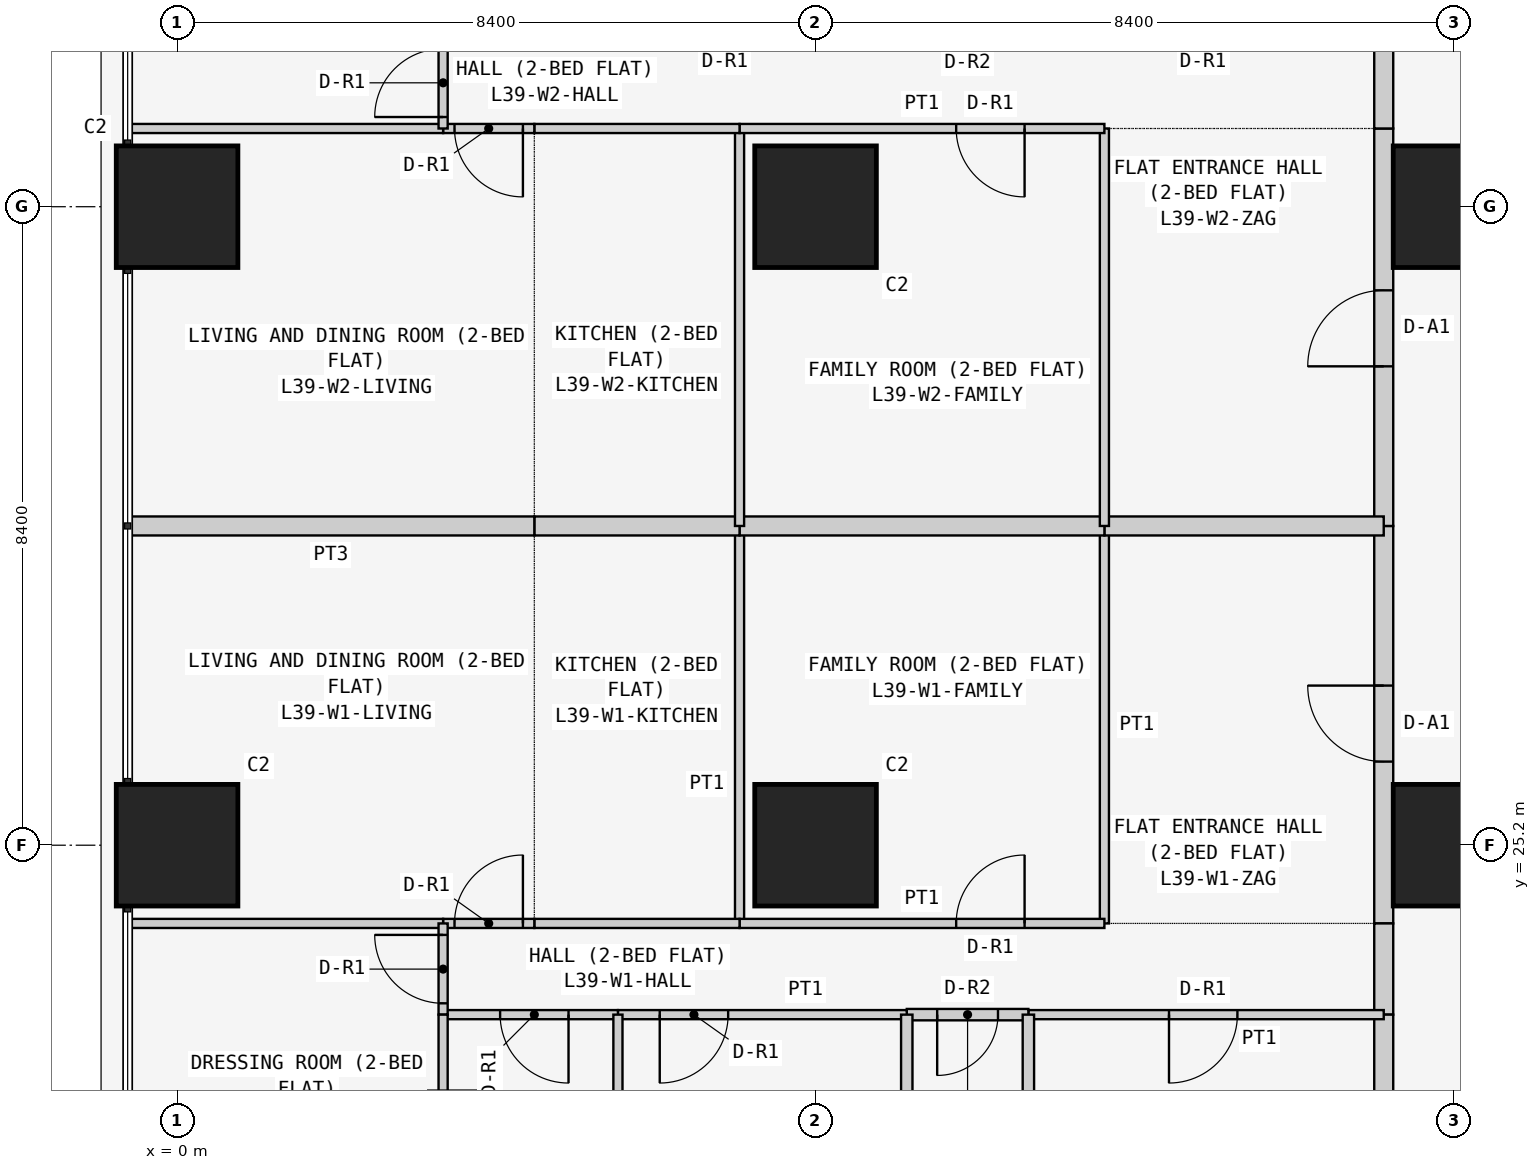
"""IFC4 building model, lengths in metres.
Left out: names, types, materials, properties, quantities, classifications, styles, units other than length and angle.
Written with IfcOpenShell. Run it as: python <this file> out.ifc"""

import sys

from ifc_helpers import new_model, si_unit, direction, frame, frame_2d, origin, origin_2d, place, context, subcontext, project, spatial, rectangle, extrude, element, fill, save


model = new_model("IFC4")
c1 = context("Model", 3, precision=1e-05, world=origin(), true_north=direction((0.0, 1.0)))
c2 = subcontext(c1, "Body", "Model", "MODEL_VIEW")
j1 = project(units=[si_unit("LENGTHUNIT", "METRE"), si_unit("PLANEANGLEUNIT", "RADIAN")], contexts=[c1])
p1 = place(None, origin())
s1 = spatial("IfcSite", under=j1, at=p1, CompositionType="ELEMENT")
p2 = place(p1, origin())
s2 = spatial("IfcBuilding", under=s1, at=p2, CompositionType="ELEMENT")
p3 = place(p2, frame((0.0, 0.0, 152.1)))
s3 = spatial("IfcBuildingStorey", under=s2, at=p3, CompositionType="ELEMENT", Elevation=152.1)
for number, where, z_axis, x_axis in (
    (1, (0.0, 25.2, 0.0), (0.0, 0.0, 1.0), (1.0, 0.0, 0.0)),
    (2, (0.0, 33.6, 0.0), (0.0, 0.0, 1.0), (1.0, 0.0, 0.0)),
    (3, (8.4, 25.2, 0.0), (0.0, 0.0, 1.0), (1.0, 0.0, 0.0)),
    (4, (8.4, 33.6, 0.0), (0.0, 0.0, 1.0), (1.0, 0.0, 0.0)),
    (5, (16.8, 25.2, 0.0), (0.0, 0.0, 1.0), (1.0, 0.0, 0.0)),
    (6, (16.8, 33.6, 0.0), (0.0, 0.0, 1.0), (1.0, 0.0, 0.0)),
):
    element("IfcColumn", number, at=place(p3, frame(where, z_axis=z_axis, x_axis=x_axis)), inside=s3, PredefinedType="COLUMN", context=c2, shape_type="SweptSolid", body=[
        extrude(rectangle(XDim=1.6, YDim=1.6, at=origin_2d()), origin(), (0.0, 0.0, 1.0), 3.6),
    ])
p4 = place(p3, frame((15.875, 24.171, 0.0), z_axis=(0.0, 0.0, 1.0), x_axis=(0.0, 1.0, 0.0)))
e7 = element("IfcWall", 7, at=p4, inside=s3, PredefinedType="PARTITIONING", context=c2, shape_type="SweptSolid", body=[
    extrude(rectangle(XDim=5.229, YDim=0.25, at=frame_2d((2.615, 0.0))), origin(), (0.0, 0.0, 1.0), 3.45),
])
p5 = place(p4, frame((2.129, 0.0, 0.0)))
e8 = element("IfcOpeningElement", 8, at=p5, cuts=e7, PredefinedType="OPENING", context=c2, shape_type="SweptSolid", body=[
    extrude(rectangle(XDim=1.0, YDim=2.1, at=frame_2d((0.5, 1.05))), frame((0.0, 0.135, 0.0), z_axis=(0.0, -1.0, 0.0), x_axis=(1.0, 0.0, 0.0)), (0.0, 0.0, 1.0), 0.27),
])
p6 = place(p3, frame((15.875, 22.971, 0.0), z_axis=(0.0, 0.0, 1.0), x_axis=(0.0, 1.0, 0.0)))
e9 = element("IfcWall", 9, at=p6, inside=s3, PredefinedType="PARTITIONING", context=c2, shape_type="SweptSolid", body=[
    extrude(rectangle(XDim=1.2, YDim=0.25, at=frame_2d((0.6, 0.0))), origin(), (0.0, 0.0, 1.0), 3.45),
])
p7 = place(p3, frame((15.875, 16.1, 0.0), z_axis=(0.0, 0.0, 1.0), x_axis=(0.0, 1.0, 0.0)))
e10 = element("IfcWall", 10, at=p7, inside=s3, PredefinedType="PARTITIONING", context=c2, shape_type="SweptSolid", body=[
    extrude(rectangle(XDim=6.871, YDim=0.25, at=frame_2d((3.436, 0.0))), origin(), (0.0, 0.0, 1.0), 3.45),
])
p8 = place(p3, frame((15.875, 29.4, 0.0), z_axis=(0.0, 0.0, 1.0), x_axis=(0.0, 1.0, 0.0)))
e11 = element("IfcWall", 11, at=p8, inside=s3, PredefinedType="PARTITIONING", context=c2, shape_type="SweptSolid", body=[
    extrude(rectangle(XDim=5.229, YDim=0.25, at=frame_2d((2.615, 0.0))), origin(), (0.0, 0.0, 1.0), 3.45),
])
p9 = place(p8, frame((2.1, 0.0, 0.0)))
e12 = element("IfcOpeningElement", 12, at=p9, cuts=e11, PredefinedType="OPENING", context=c2, shape_type="SweptSolid", body=[
    extrude(rectangle(XDim=1.0, YDim=2.1, at=frame_2d((0.5, 1.05))), frame((0.0, 0.135, 0.0), z_axis=(0.0, -1.0, 0.0), x_axis=(1.0, 0.0, 0.0)), (0.0, 0.0, 1.0), 0.27),
])
p10 = place(p3, frame((15.875, 34.629, 0.0), z_axis=(0.0, 0.0, 1.0), x_axis=(0.0, 1.0, 0.0)))
e13 = element("IfcWall", 13, at=p10, inside=s3, PredefinedType="PARTITIONING", context=c2, shape_type="SweptSolid", body=[
    extrude(rectangle(XDim=1.2, YDim=0.25, at=frame_2d((0.6, 0.0))), origin(), (0.0, 0.0, 1.0), 3.45),
])
p11 = place(p3, frame((12.2, 29.4, 0.0), z_axis=(0.0, 0.0, 1.0), x_axis=(0.0, -1.0, 0.0)))
e14 = element("IfcWall", 14, at=p11, inside=s3, PredefinedType="PARTITIONING", context=c2, shape_type="SweptSolid", body=[
    extrude(rectangle(XDim=5.229, YDim=0.12, at=frame_2d((2.615, 0.0))), origin(), (0.0, 0.0, 1.0), 3.45),
])
p12 = place(p3, frame((15.875, 29.4, 0.0), z_axis=(0.0, 0.0, 1.0), x_axis=(-1.0, 0.0, 0.0)))
e15 = element("IfcWall", 15, at=p12, inside=s3, PredefinedType="PARTITIONING", context=c2, shape_type="SweptSolid", body=[
    extrude(rectangle(XDim=3.675, YDim=0.25, at=frame_2d((1.837, 0.0))), origin(), (0.0, 0.0, 1.0), 3.45),
])
p13 = place(p3, frame((7.4, 29.4, 0.0), z_axis=(0.0, 0.0, 1.0), x_axis=(0.0, -1.0, 0.0)))
e16 = element("IfcWall", 16, at=p13, inside=s3, PredefinedType="PARTITIONING", context=c2, shape_type="SweptSolid", body=[
    extrude(rectangle(XDim=5.229, YDim=0.12, at=frame_2d((2.615, 0.0))), origin(), (0.0, 0.0, 1.0), 3.45),
])
p14 = place(p3, frame((7.4, 24.171, 0.0), z_axis=(0.0, 0.0, 1.0), x_axis=(1.0, 0.0, 0.0)))
e17 = element("IfcWall", 17, at=p14, inside=s3, PredefinedType="PARTITIONING", context=c2, shape_type="SweptSolid", body=[
    extrude(rectangle(XDim=4.8, YDim=0.12, at=frame_2d((2.4, 0.0))), origin(), (0.0, 0.0, 1.0), 3.45),
])
p15 = place(p14, frame((2.85, 0.0, 0.0)))
e18 = element("IfcOpeningElement", 18, at=p15, cuts=e17, PredefinedType="OPENING", context=c2, shape_type="SweptSolid", body=[
    extrude(rectangle(XDim=0.9, YDim=2.1, at=frame_2d((0.45, 1.05))), frame((0.0, 0.07, 0.0), z_axis=(0.0, -1.0, 0.0), x_axis=(1.0, 0.0, 0.0)), (0.0, 0.0, 1.0), 0.14),
])
p16 = place(p3, frame((12.2, 29.4, 0.0), z_axis=(0.0, 0.0, 1.0), x_axis=(-1.0, 0.0, 0.0)))
e19 = element("IfcWall", 19, at=p16, inside=s3, PredefinedType="PARTITIONING", context=c2, shape_type="SweptSolid", body=[
    extrude(rectangle(XDim=4.8, YDim=0.25, at=frame_2d((2.4, 0.0))), origin(), (0.0, 0.0, 1.0), 3.45),
])
p17 = place(p3, frame((4.7, 24.171, 0.0), z_axis=(0.0, 0.0, 1.0), x_axis=(1.0, 0.0, 0.0)))
e20 = element("IfcWall", 20, at=p17, inside=s3, PredefinedType="PARTITIONING", context=c2, shape_type="SweptSolid", body=[
    extrude(rectangle(XDim=2.7, YDim=0.12, at=frame_2d((1.35, 0.0))), origin(), (0.0, 0.0, 1.0), 3.45),
])
p18 = place(p3, frame((7.4, 29.4, 0.0), z_axis=(0.0, 0.0, 1.0), x_axis=(-1.0, 0.0, 0.0)))
e21 = element("IfcWall", 21, at=p18, inside=s3, PredefinedType="PARTITIONING", context=c2, shape_type="SweptSolid", body=[
    extrude(rectangle(XDim=2.7, YDim=0.25, at=frame_2d((1.35, 0.0))), origin(), (0.0, 0.0, 1.0), 3.45),
])
p19 = place(p3, frame((3.5, 24.171, 0.0), z_axis=(0.0, 0.0, 1.0), x_axis=(1.0, 0.0, 0.0)))
e22 = element("IfcWall", 22, at=p19, inside=s3, PredefinedType="PARTITIONING", context=c2, shape_type="SweptSolid", body=[
    extrude(rectangle(XDim=1.2, YDim=0.12, at=frame_2d((0.6, 0.0))), origin(), (0.0, 0.0, 1.0), 3.45),
])
p20 = place(p19, frame((0.15, 0.0, 0.0)))
e23 = element("IfcOpeningElement", 23, at=p20, cuts=e22, PredefinedType="OPENING", context=c2, shape_type="SweptSolid", body=[
    extrude(rectangle(XDim=0.9, YDim=2.1, at=frame_2d((0.45, 1.05))), frame((0.0, 0.07, 0.0), z_axis=(0.0, -1.0, 0.0), x_axis=(1.0, 0.0, 0.0)), (0.0, 0.0, 1.0), 0.14),
])
p21 = place(p3, frame((-0.65, 24.171, 0.0), z_axis=(0.0, 0.0, 1.0), x_axis=(1.0, 0.0, 0.0)))
e24 = element("IfcWall", 24, at=p21, inside=s3, PredefinedType="PARTITIONING", context=c2, shape_type="SweptSolid", body=[
    extrude(rectangle(XDim=4.15, YDim=0.12, at=frame_2d((2.075, 0.0))), origin(), (0.0, 0.0, 1.0), 3.45),
])
p22 = place(p3, frame((4.7, 29.4, 0.0), z_axis=(0.0, 0.0, 1.0), x_axis=(-1.0, 0.0, 0.0)))
e25 = element("IfcWall", 25, at=p22, inside=s3, PredefinedType="PARTITIONING", context=c2, shape_type="SweptSolid", body=[
    extrude(rectangle(XDim=5.35, YDim=0.25, at=frame_2d((2.675, 0.0))), origin(), (0.0, 0.0, 1.0), 3.45),
])
p23 = place(p3, frame((11.2, 22.971, 0.0), z_axis=(0.0, 0.0, 1.0), x_axis=(1.0, 0.0, 0.0)))
e26 = element("IfcWall", 26, at=p23, inside=s3, PredefinedType="PARTITIONING", context=c2, shape_type="SweptSolid", body=[
    extrude(rectangle(XDim=4.675, YDim=0.12, at=frame_2d((2.337, 0.0))), origin(), (0.0, 0.0, 1.0), 3.45),
])
p24 = place(p23, frame((1.85, 0.0, 0.0)))
e27 = element("IfcOpeningElement", 27, at=p24, cuts=e26, PredefinedType="OPENING", context=c2, shape_type="SweptSolid", body=[
    extrude(rectangle(XDim=0.9, YDim=2.1, at=frame_2d((0.45, 1.05))), frame((0.0, 0.07, 0.0), z_axis=(0.0, -1.0, 0.0), x_axis=(1.0, 0.0, 0.0)), (0.0, 0.0, 1.0), 0.14),
])
p25 = place(p3, frame((9.6, 22.971, 0.0), z_axis=(0.0, 0.0, 1.0), x_axis=(1.0, 0.0, 0.0)))
e28 = element("IfcWall", 28, at=p25, inside=s3, PredefinedType="PARTITIONING", context=c2, shape_type="SweptSolid", body=[
    extrude(rectangle(XDim=1.6, YDim=0.15, at=frame_2d((0.8, 0.0))), origin(), (0.0, 0.0, 1.0), 3.45),
])
p26 = place(p25, frame((0.4, 0.0, 0.0)))
e29 = element("IfcOpeningElement", 29, at=p26, cuts=e28, PredefinedType="OPENING", context=c2, shape_type="SweptSolid", body=[
    extrude(rectangle(XDim=0.8, YDim=2.1, at=frame_2d((0.4, 1.05))), frame((0.0, 0.085, 0.0), z_axis=(0.0, -1.0, 0.0), x_axis=(1.0, 0.0, 0.0)), (0.0, 0.0, 1.0), 0.17),
])
p27 = place(p3, frame((5.8, 22.971, 0.0), z_axis=(0.0, 0.0, 1.0), x_axis=(1.0, 0.0, 0.0)))
e30 = element("IfcWall", 30, at=p27, inside=s3, PredefinedType="PARTITIONING", context=c2, shape_type="SweptSolid", body=[
    extrude(rectangle(XDim=3.8, YDim=0.12, at=frame_2d((1.9, 0.0))), origin(), (0.0, 0.0, 1.0), 3.45),
])
p28 = place(p27, frame((0.55, 0.0, 0.0)))
e31 = element("IfcOpeningElement", 31, at=p28, cuts=e30, PredefinedType="OPENING", context=c2, shape_type="SweptSolid", body=[
    extrude(rectangle(XDim=0.9, YDim=2.1, at=frame_2d((0.45, 1.05))), frame((0.0, 0.07, 0.0), z_axis=(0.0, -1.0, 0.0), x_axis=(1.0, 0.0, 0.0)), (0.0, 0.0, 1.0), 0.14),
])
p29 = place(p3, frame((3.5, 22.971, 0.0), z_axis=(0.0, 0.0, 1.0), x_axis=(1.0, 0.0, 0.0)))
e32 = element("IfcWall", 32, at=p29, inside=s3, PredefinedType="PARTITIONING", context=c2, shape_type="SweptSolid", body=[
    extrude(rectangle(XDim=2.3, YDim=0.12, at=frame_2d((1.15, 0.0))), origin(), (0.0, 0.0, 1.0), 3.45),
])
p30 = place(p29, frame((0.75, 0.0, 0.0)))
e33 = element("IfcOpeningElement", 33, at=p30, cuts=e32, PredefinedType="OPENING", context=c2, shape_type="SweptSolid", body=[
    extrude(rectangle(XDim=0.9, YDim=2.1, at=frame_2d((0.45, 1.05))), frame((0.0, 0.07, 0.0), z_axis=(0.0, -1.0, 0.0), x_axis=(1.0, 0.0, 0.0)), (0.0, 0.0, 1.0), 0.14),
])
p31 = place(p3, frame((3.5, 24.171, 0.0), z_axis=(0.0, 0.0, 1.0), x_axis=(0.0, -1.0, 0.0)))
e34 = element("IfcWall", 34, at=p31, inside=s3, PredefinedType="PARTITIONING", context=c2, shape_type="SweptSolid", body=[
    extrude(rectangle(XDim=1.2, YDim=0.12, at=frame_2d((0.6, 0.0))), origin(), (0.0, 0.0, 1.0), 3.45),
])
p32 = place(p31, frame((0.151, 0.0, 0.0)))
e35 = element("IfcOpeningElement", 35, at=p32, cuts=e34, PredefinedType="OPENING", context=c2, shape_type="SweptSolid", body=[
    extrude(rectangle(XDim=0.9, YDim=2.1, at=frame_2d((0.45, 1.05))), frame((0.0, 0.07, 0.0), z_axis=(0.0, -1.0, 0.0), x_axis=(1.0, 0.0, 0.0)), (0.0, 0.0, 1.0), 0.14),
])
for number, where, z_axis, x_axis in (
    (36, (11.2, 22.971, 0.0), (0.0, 0.0, 1.0), (0.0, -1.0, 0.0)),
    (37, (9.6, 22.971, 0.0), (0.0, 0.0, 1.0), (0.0, -1.0, 0.0)),
):
    element("IfcWall", number, at=place(p3, frame(where, z_axis=z_axis, x_axis=x_axis)), inside=s3, PredefinedType="PARTITIONING", context=c2, shape_type="SweptSolid", body=[
        extrude(rectangle(XDim=6.871, YDim=0.15, at=frame_2d((3.436, 0.0))), origin(), (0.0, 0.0, 1.0), 3.45),
    ])
for number, where, z_axis, x_axis in (
    (38, (5.8, 20.971, 0.0), (0.0, 0.0, 1.0), (0.0, 1.0, 0.0)),
    (39, (3.5, 22.971, 0.0), (0.0, 0.0, 1.0), (0.0, -1.0, 0.0)),
):
    element("IfcWall", number, at=place(p3, frame(where, z_axis=z_axis, x_axis=x_axis)), inside=s3, PredefinedType="PARTITIONING", context=c2, shape_type="SweptSolid", body=[
        extrude(rectangle(XDim=2.0, YDim=0.12, at=frame_2d((1.0, 0.0))), origin(), (0.0, 0.0, 1.0), 3.45),
    ])
for number, where, z_axis, x_axis in (
    (40, (12.2, 29.4, 0.0), (0.0, 0.0, 1.0), (0.0, 1.0, 0.0)),
    (41, (7.4, 29.4, 0.0), (0.0, 0.0, 1.0), (0.0, 1.0, 0.0)),
):
    element("IfcWall", number, at=place(p3, frame(where, z_axis=z_axis, x_axis=x_axis)), inside=s3, PredefinedType="PARTITIONING", context=c2, shape_type="SweptSolid", body=[
        extrude(rectangle(XDim=5.229, YDim=0.12, at=frame_2d((2.615, 0.0))), origin(), (0.0, 0.0, 1.0), 3.45),
    ])
p33 = place(p3, frame((7.4, 34.629, 0.0), z_axis=(0.0, 0.0, 1.0), x_axis=(1.0, 0.0, 0.0)))
e42 = element("IfcWall", 42, at=p33, inside=s3, PredefinedType="PARTITIONING", context=c2, shape_type="SweptSolid", body=[
    extrude(rectangle(XDim=4.8, YDim=0.12, at=frame_2d((2.4, 0.0))), origin(), (0.0, 0.0, 1.0), 3.45),
])
p34 = place(p33, frame((2.85, 0.0, 0.0)))
e43 = element("IfcOpeningElement", 43, at=p34, cuts=e42, PredefinedType="OPENING", context=c2, shape_type="SweptSolid", body=[
    extrude(rectangle(XDim=0.9, YDim=2.1, at=frame_2d((0.45, 1.05))), frame((0.0, 0.07, 0.0), z_axis=(0.0, -1.0, 0.0), x_axis=(1.0, 0.0, 0.0)), (0.0, 0.0, 1.0), 0.14),
])
p35 = place(p3, frame((4.7, 34.629, 0.0), z_axis=(0.0, 0.0, 1.0), x_axis=(1.0, 0.0, 0.0)))
e44 = element("IfcWall", 44, at=p35, inside=s3, PredefinedType="PARTITIONING", context=c2, shape_type="SweptSolid", body=[
    extrude(rectangle(XDim=2.7, YDim=0.12, at=frame_2d((1.35, 0.0))), origin(), (0.0, 0.0, 1.0), 3.45),
])
p36 = place(p3, frame((3.5, 34.629, 0.0), z_axis=(0.0, 0.0, 1.0), x_axis=(1.0, 0.0, 0.0)))
e45 = element("IfcWall", 45, at=p36, inside=s3, PredefinedType="PARTITIONING", context=c2, shape_type="SweptSolid", body=[
    extrude(rectangle(XDim=1.2, YDim=0.12, at=frame_2d((0.6, 0.0))), origin(), (0.0, 0.0, 1.0), 3.45),
])
p37 = place(p36, frame((0.15, 0.0, 0.0)))
e46 = element("IfcOpeningElement", 46, at=p37, cuts=e45, PredefinedType="OPENING", context=c2, shape_type="SweptSolid", body=[
    extrude(rectangle(XDim=0.9, YDim=2.1, at=frame_2d((0.45, 1.05))), frame((0.0, 0.07, 0.0), z_axis=(0.0, -1.0, 0.0), x_axis=(1.0, 0.0, 0.0)), (0.0, 0.0, 1.0), 0.14),
])
p38 = place(p3, frame((-0.65, 34.629, 0.0), z_axis=(0.0, 0.0, 1.0), x_axis=(1.0, 0.0, 0.0)))
e47 = element("IfcWall", 47, at=p38, inside=s3, PredefinedType="PARTITIONING", context=c2, shape_type="SweptSolid", body=[
    extrude(rectangle(XDim=4.15, YDim=0.12, at=frame_2d((2.075, 0.0))), origin(), (0.0, 0.0, 1.0), 3.45),
])
p39 = place(p3, frame((3.5, 34.629, 0.0), z_axis=(0.0, 0.0, 1.0), x_axis=(0.0, 1.0, 0.0)))
e48 = element("IfcWall", 48, at=p39, inside=s3, PredefinedType="PARTITIONING", context=c2, shape_type="SweptSolid", body=[
    extrude(rectangle(XDim=1.2, YDim=0.12, at=frame_2d((0.6, 0.0))), origin(), (0.0, 0.0, 1.0), 3.45),
])
p40 = place(p39, frame((0.151, 0.0, 0.0)))
e49 = element("IfcOpeningElement", 49, at=p40, cuts=e48, PredefinedType="OPENING", context=c2, shape_type="SweptSolid", body=[
    extrude(rectangle(XDim=0.9, YDim=2.1, at=frame_2d((0.45, 1.05))), frame((0.0, 0.07, 0.0), z_axis=(0.0, -1.0, 0.0), x_axis=(1.0, 0.0, 0.0)), (0.0, 0.0, 1.0), 0.14),
])
p41 = place(p5, origin())
e50 = element("IfcDoor", 50, at=p41, inside=s3, OperationType="SINGLE_SWING_RIGHT", PredefinedType="DOOR", context=c2, shape_type="SweptSolid", body=[
    extrude(rectangle(XDim=1.0, YDim=2.1, at=frame_2d((0.5, 1.05))), frame((0.0, 0.025, 0.0), z_axis=(0.0, -1.0, 0.0), x_axis=(1.0, 0.0, 0.0)), (0.0, 0.0, 1.0), 0.05),
])
fill(e8, e50)
p42 = place(p15, origin())
e51 = element("IfcDoor", 51, at=p42, inside=s3, OperationType="SINGLE_SWING_RIGHT", PredefinedType="DOOR", context=c2, shape_type="SweptSolid", body=[
    extrude(rectangle(XDim=0.9, YDim=2.1, at=frame_2d((0.45, 1.05))), frame((0.0, 0.025, 0.0), z_axis=(0.0, -1.0, 0.0), x_axis=(1.0, 0.0, 0.0)), (0.0, 0.0, 1.0), 0.05),
])
fill(e18, e51)
p43 = place(p20, origin())
e52 = element("IfcDoor", 52, at=p43, inside=s3, OperationType="SINGLE_SWING_RIGHT", PredefinedType="DOOR", context=c2, shape_type="SweptSolid", body=[
    extrude(rectangle(XDim=0.9, YDim=2.1, at=frame_2d((0.45, 1.05))), frame((0.0, 0.025, 0.0), z_axis=(0.0, -1.0, 0.0), x_axis=(1.0, 0.0, 0.0)), (0.0, 0.0, 1.0), 0.05),
])
fill(e23, e52)
p44 = place(p24, frame((0.9, 0.0, 0.0), z_axis=(0.0, 0.0, 1.0), x_axis=(-1.0, 0.0, 0.0)))
e53 = element("IfcDoor", 53, at=p44, inside=s3, OperationType="SINGLE_SWING_RIGHT", PredefinedType="DOOR", context=c2, shape_type="SweptSolid", body=[
    extrude(rectangle(XDim=0.9, YDim=2.1, at=frame_2d((0.45, 1.05))), frame((0.0, 0.025, 0.0), z_axis=(0.0, -1.0, 0.0), x_axis=(1.0, 0.0, 0.0)), (0.0, 0.0, 1.0), 0.05),
])
fill(e27, e53)
p45 = place(p26, frame((0.8, 0.0, 0.0), z_axis=(0.0, 0.0, 1.0), x_axis=(-1.0, 0.0, 0.0)))
e54 = element("IfcDoor", 54, at=p45, inside=s3, OperationType="SINGLE_SWING_RIGHT", PredefinedType="DOOR", context=c2, shape_type="SweptSolid", body=[
    extrude(rectangle(XDim=0.8, YDim=2.1, at=frame_2d((0.4, 1.05))), frame((0.0, 0.025, 0.0), z_axis=(0.0, -1.0, 0.0), x_axis=(1.0, 0.0, 0.0)), (0.0, 0.0, 1.0), 0.05),
])
fill(e29, e54)
p46 = place(p28, frame((0.9, 0.0, 0.0), z_axis=(0.0, 0.0, 1.0), x_axis=(-1.0, 0.0, 0.0)))
e55 = element("IfcDoor", 55, at=p46, inside=s3, OperationType="SINGLE_SWING_RIGHT", PredefinedType="DOOR", context=c2, shape_type="SweptSolid", body=[
    extrude(rectangle(XDim=0.9, YDim=2.1, at=frame_2d((0.45, 1.05))), frame((0.0, 0.025, 0.0), z_axis=(0.0, -1.0, 0.0), x_axis=(1.0, 0.0, 0.0)), (0.0, 0.0, 1.0), 0.05),
])
fill(e31, e55)
p47 = place(p30, frame((0.9, 0.0, 0.0), z_axis=(0.0, 0.0, 1.0), x_axis=(-1.0, 0.0, 0.0)))
e56 = element("IfcDoor", 56, at=p47, inside=s3, OperationType="SINGLE_SWING_LEFT", PredefinedType="DOOR", context=c2, shape_type="SweptSolid", body=[
    extrude(rectangle(XDim=0.9, YDim=2.1, at=frame_2d((0.45, 1.05))), frame((0.0, 0.025, 0.0), z_axis=(0.0, -1.0, 0.0), x_axis=(1.0, 0.0, 0.0)), (0.0, 0.0, 1.0), 0.05),
])
fill(e33, e56)
p48 = place(p32, frame((0.9, 0.0, 0.0), z_axis=(0.0, 0.0, 1.0), x_axis=(-1.0, 0.0, 0.0)))
e57 = element("IfcDoor", 57, at=p48, inside=s3, OperationType="SINGLE_SWING_RIGHT", PredefinedType="DOOR", context=c2, shape_type="SweptSolid", body=[
    extrude(rectangle(XDim=0.9, YDim=2.1, at=frame_2d((0.45, 1.05))), frame((0.0, 0.025, 0.0), z_axis=(0.0, -1.0, 0.0), x_axis=(1.0, 0.0, 0.0)), (0.0, 0.0, 1.0), 0.05),
])
fill(e35, e57)
p49 = place(p9, origin())
e58 = element("IfcDoor", 58, at=p49, inside=s3, OperationType="SINGLE_SWING_LEFT", PredefinedType="DOOR", context=c2, shape_type="SweptSolid", body=[
    extrude(rectangle(XDim=1.0, YDim=2.1, at=frame_2d((0.5, 1.05))), frame((0.0, 0.025, 0.0), z_axis=(0.0, -1.0, 0.0), x_axis=(1.0, 0.0, 0.0)), (0.0, 0.0, 1.0), 0.05),
])
fill(e12, e58)
p50 = place(p34, frame((0.9, 0.0, 0.0), z_axis=(0.0, 0.0, 1.0), x_axis=(-1.0, 0.0, 0.0)))
e59 = element("IfcDoor", 59, at=p50, inside=s3, OperationType="SINGLE_SWING_LEFT", PredefinedType="DOOR", context=c2, shape_type="SweptSolid", body=[
    extrude(rectangle(XDim=0.9, YDim=2.1, at=frame_2d((0.45, 1.05))), frame((0.0, 0.025, 0.0), z_axis=(0.0, -1.0, 0.0), x_axis=(1.0, 0.0, 0.0)), (0.0, 0.0, 1.0), 0.05),
])
fill(e43, e59)
p51 = place(p37, frame((0.9, 0.0, 0.0), z_axis=(0.0, 0.0, 1.0), x_axis=(-1.0, 0.0, 0.0)))
e60 = element("IfcDoor", 60, at=p51, inside=s3, OperationType="SINGLE_SWING_LEFT", PredefinedType="DOOR", context=c2, shape_type="SweptSolid", body=[
    extrude(rectangle(XDim=0.9, YDim=2.1, at=frame_2d((0.45, 1.05))), frame((0.0, 0.025, 0.0), z_axis=(0.0, -1.0, 0.0), x_axis=(1.0, 0.0, 0.0)), (0.0, 0.0, 1.0), 0.05),
])
fill(e46, e60)
p52 = place(p40, origin())
e61 = element("IfcDoor", 61, at=p52, inside=s3, OperationType="SINGLE_SWING_LEFT", PredefinedType="DOOR", context=c2, shape_type="SweptSolid", body=[
    extrude(rectangle(XDim=0.9, YDim=2.1, at=frame_2d((0.45, 1.05))), frame((0.0, 0.025, 0.0), z_axis=(0.0, -1.0, 0.0), x_axis=(1.0, 0.0, 0.0)), (0.0, 0.0, 1.0), 0.05),
])
fill(e49, e61)
save(model, sys.argv[1])
